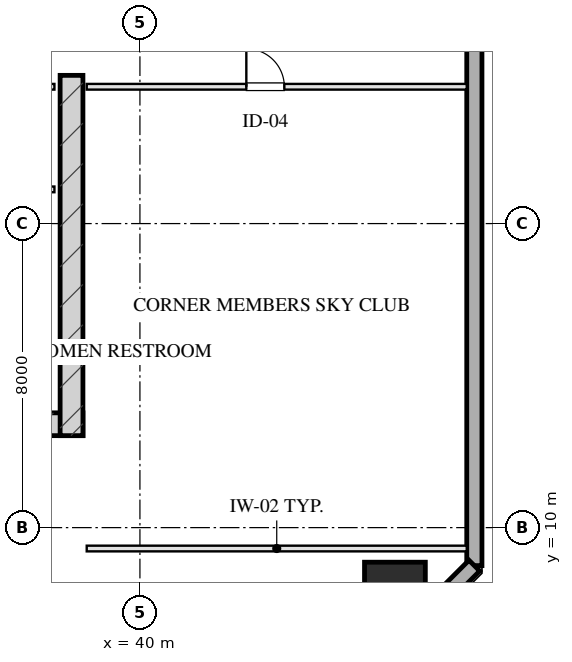
"""IFC4 building model, lengths in metres.
Left out: names, types, materials, properties, quantities, classifications, styles, units other than length and angle.
Written with IfcOpenShell. Run it as: python <this file> out.ifc"""

import sys

from ifc_helpers import new_model, si_unit, direction, frame, frame_2d, origin, origin_2d, place, context, subcontext, project, spatial, rectangle, hollow_rectangle, extrude, element, fill, save


model = new_model("IFC4")
c1 = context("Model", 3, precision=1e-05, world=origin(), true_north=direction((0.0, 1.0)))
c2 = subcontext(c1, "Body", "Model", "MODEL_VIEW")
j1 = project(units=[si_unit("LENGTHUNIT", "METRE"), si_unit("PLANEANGLEUNIT", "RADIAN")], contexts=[c1])
p1 = place(None, origin())
s1 = spatial("IfcSite", under=j1, at=p1, CompositionType="ELEMENT")
p2 = place(p1, origin())
s2 = spatial("IfcBuilding", under=s1, at=p2, CompositionType="ELEMENT")
p3 = place(p2, frame((0.0, 0.0, 152.95)))
s3 = spatial("IfcBuildingStorey", under=s2, at=p3, CompositionType="ELEMENT", Elevation=152.95)
p4 = place(p3, frame((21.5, 12.72, 0.0), z_axis=(0.0, 0.0, 1.0), x_axis=(1.0, 0.0, 0.0)))
e1 = element("IfcWall", 1, at=p4, inside=s3, PredefinedType="SHEAR", context=c2, shape_type="SweptSolid", body=[
    extrude(rectangle(XDim=17.0, YDim=0.6, at=frame_2d((8.5, 0.0))), origin(), (0.0, 0.0, 1.0), 3.45),
])
p5 = place(p3, frame((38.2, 21.9, 0.0), z_axis=(0.0, 0.0, 1.0), x_axis=(0.0, -1.0, 0.0)))
e2 = element("IfcWall", 2, at=p5, inside=s3, PredefinedType="SHEAR", context=c2, shape_type="SweptSolid", body=[
    extrude(rectangle(XDim=9.48, YDim=0.6, at=frame_2d((4.74, 0.0))), origin(), (0.0, 0.0, 1.0), 3.45),
])
p6 = place(p3, frame((46.71, 8.29, 0.0), z_axis=(0.0, 0.0, 1.0), x_axis=(1.0, 0.0, 0.0)))
e3 = element("IfcColumn", 3, at=p6, inside=s3, PredefinedType="COLUMN", context=c2, shape_type="SweptSolid", body=[
    extrude(hollow_rectangle(XDim=1.6, YDim=1.6, WallThickness=0.055, at=origin_2d()), origin(), (0.0, 0.0, 1.0), 3.451),
])
p7 = place(p3, frame((48.8, 59.0, 0.0), z_axis=(0.0, 0.0, 1.0), x_axis=(0.0, -1.0, 0.0)))
e4 = element("IfcWall", 4, at=p7, inside=s3, PredefinedType="SOLIDWALL", context=c2, shape_type="SweptSolid", body=[
    extrude(rectangle(XDim=50.0, YDim=0.4, at=frame_2d((25.0, 0.0))), origin(), (0.0, 0.0, 1.0), 2.61),
])
p8 = place(p7, frame((30.25, 0.0, 0.0)))
e5 = element("IfcOpeningElement", 5, at=p8, cuts=e4, PredefinedType="OPENING", context=c2, shape_type="SweptSolid", body=[
    extrude(rectangle(XDim=1.1, YDim=2.15, at=frame_2d((0.55, 1.075))), frame((0.0, 0.21, 0.0), z_axis=(0.0, -1.0, 0.0), x_axis=(1.0, 0.0, 0.0)), (0.0, 0.0, 1.0), 0.42),
])
p9 = place(p3, frame((48.8, 9.0, 0.0), z_axis=(0.0, 0.0, 1.0), x_axis=(-0.707106781187, -0.707106781187, 0.0)))
e6 = element("IfcWall", 6, at=p9, inside=s3, PredefinedType="SOLIDWALL", context=c2, shape_type="SweptSolid", body=[
    extrude(rectangle(XDim=3.96, YDim=0.4, at=frame_2d((1.98, 0.0))), origin(), (0.0, 0.0, 1.0), 2.61),
])
p10 = place(p3, frame((33.95, 21.6, 0.0), z_axis=(0.0, 0.0, 1.0), x_axis=(1.0, 0.0, 0.0)))
e7 = element("IfcWall", 7, at=p10, inside=s3, PredefinedType="PARTITIONING", context=c2, shape_type="SweptSolid", body=[
    extrude(rectangle(XDim=3.8, YDim=0.15, at=frame_2d((1.9, 0.0))), origin(), (0.0, 0.0, 1.0), 3.175),
])
p11 = place(p10, frame((0.45, 0.0, 0.0)))
e8 = element("IfcOpeningElement", 8, at=p11, cuts=e7, PredefinedType="OPENING", context=c2, shape_type="SweptSolid", body=[
    extrude(rectangle(XDim=0.95, YDim=2.05, at=frame_2d((0.475, 1.025))), frame((0.0, 0.085, 0.0), z_axis=(0.0, -1.0, 0.0), x_axis=(1.0, 0.0, 0.0)), (0.0, 0.0, 1.0), 0.17),
])
p12 = place(p3, frame((33.95, 18.9, 0.0), z_axis=(0.0, 0.0, 1.0), x_axis=(1.0, 0.0, 0.0)))
e9 = element("IfcWall", 9, at=p12, inside=s3, PredefinedType="PARTITIONING", context=c2, shape_type="SweptSolid", body=[
    extrude(rectangle(XDim=3.8, YDim=0.15, at=frame_2d((1.9, 0.0))), origin(), (0.0, 0.0, 1.0), 3.175),
])
p13 = place(p12, frame((0.35, 0.0, 0.0)))
e10 = element("IfcOpeningElement", 10, at=p13, cuts=e9, PredefinedType="OPENING", context=c2, shape_type="SweptSolid", body=[
    extrude(rectangle(XDim=0.9, YDim=2.05, at=frame_2d((0.45, 1.025))), frame((0.0, 0.085, 0.0), z_axis=(0.0, -1.0, 0.0), x_axis=(1.0, 0.0, 0.0)), (0.0, 0.0, 1.0), 0.17),
])
p14 = place(p12, frame((2.1, 0.0, 0.0)))
e11 = element("IfcOpeningElement", 11, at=p14, cuts=e9, PredefinedType="OPENING", context=c2, shape_type="SweptSolid", body=[
    extrude(rectangle(XDim=0.9, YDim=2.05, at=frame_2d((0.45, 1.025))), frame((0.0, 0.085, 0.0), z_axis=(0.0, -1.0, 0.0), x_axis=(1.0, 0.0, 0.0)), (0.0, 0.0, 1.0), 0.17),
])
p15 = place(p3, frame((38.6, 9.45, 0.0), z_axis=(0.0, 0.0, 1.0), x_axis=(1.0, 0.0, 0.0)))
e12 = element("IfcWall", 12, at=p15, inside=s3, PredefinedType="PARTITIONING", context=c2, shape_type="SweptSolid", body=[
    extrude(rectangle(XDim=10.0, YDim=0.15, at=frame_2d((5.0, 0.0))), origin(), (0.0, 0.0, 1.0), 3.175),
])
p16 = place(p3, frame((38.6, 21.6, 0.0), z_axis=(0.0, 0.0, 1.0), x_axis=(1.0, 0.0, 0.0)))
e13 = element("IfcWall", 13, at=p16, inside=s3, PredefinedType="PARTITIONING", context=c2, shape_type="SweptSolid", body=[
    extrude(rectangle(XDim=10.0, YDim=0.15, at=frame_2d((5.0, 0.0))), origin(), (0.0, 0.0, 1.0), 3.175),
])
p17 = place(p16, frame((4.2, 0.0, 0.0)))
e14 = element("IfcOpeningElement", 14, at=p17, cuts=e13, PredefinedType="OPENING", context=c2, shape_type="SweptSolid", body=[
    extrude(rectangle(XDim=1.0, YDim=2.05, at=frame_2d((0.5, 1.025))), frame((0.0, 0.085, 0.0), z_axis=(0.0, -1.0, 0.0), x_axis=(1.0, 0.0, 0.0)), (0.0, 0.0, 1.0), 0.17),
])
p18 = place(p17, origin())
e15 = element("IfcDoor", 15, at=p18, inside=s3, OperationType="SINGLE_SWING_LEFT", PredefinedType="DOOR", context=c2, shape_type="SweptSolid", body=[
    extrude(rectangle(XDim=1.0, YDim=2.05, at=frame_2d((0.5, 1.025))), frame((0.0, 0.025, 0.0), z_axis=(0.0, -1.0, 0.0), x_axis=(1.0, 0.0, 0.0)), (0.0, 0.0, 1.0), 0.05),
])
fill(e14, e15)
save(model, sys.argv[1])
